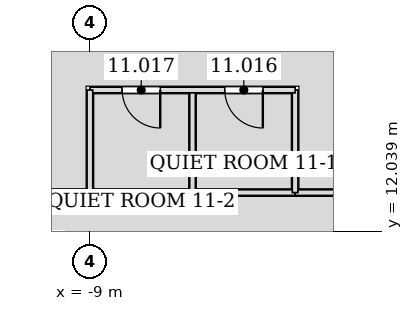
"""IFC4 building model, lengths in metres.
Left out: names, types, materials, properties, quantities, classifications, styles, units other than length and angle.
Written with IfcOpenShell. Run it as: python <this file> out.ifc"""

import sys

from ifc_helpers import new_model, si_unit, direction, frame, frame_2d, origin, place, context, subcontext, project, spatial, rectangle, extrude, element, fill, save


model = new_model("IFC4")
c1 = context("Model", 3, precision=1e-05, world=origin(), true_north=direction((0.0, 1.0)))
c2 = subcontext(c1, "Body", "Model", "MODEL_VIEW")
j1 = project(units=[si_unit("LENGTHUNIT", "METRE"), si_unit("PLANEANGLEUNIT", "RADIAN")], contexts=[c1])
p1 = place(None, origin())
s1 = spatial("IfcSite", under=j1, at=p1, CompositionType="ELEMENT")
p2 = place(p1, origin())
s2 = spatial("IfcBuilding", under=s1, at=p2, CompositionType="ELEMENT")
p3 = place(p2, frame((0.0, 0.0, 54.0)))
s3 = spatial("IfcBuildingStorey", under=s2, at=p3, CompositionType="ELEMENT", Elevation=54.0)
for number, where, z_axis, x_axis in (
    (1, (-3.599, 13.05, 0.0), (0.0, 0.0, 1.0), (-1.0, 0.0, 0.0)),
    (2, (-6.299, 13.05, 0.0), (0.0, 0.0, 1.0), (-1.0, 0.0, 0.0)),
):
    element("IfcWall", number, at=place(p3, frame(where, z_axis=z_axis, x_axis=x_axis)), inside=s3, PredefinedType="PARTITIONING", context=c2, shape_type="SweptSolid", body=[
        extrude(rectangle(XDim=2.702, YDim=0.15, at=frame_2d((1.351, 0.0))), origin(), (0.0, 0.0, 1.0), 4.035),
    ])
p4 = place(p3, frame((-8.999, 13.05, 0.0), z_axis=(0.0, 0.0, 1.0), x_axis=(-1.0, 0.0, 0.0)))
e3 = element("IfcWall", 3, at=p4, inside=s3, PredefinedType="PARTITIONING", context=c2, shape_type="SweptSolid", body=[
    extrude(rectangle(XDim=4.051, YDim=0.15, at=frame_2d((2.025, 0.0))), origin(), (0.0, 0.0, 1.0), 3.014),
])
p5 = place(p3, frame((13.05, 13.05, 0.0), z_axis=(0.0, 0.0, 1.0), x_axis=(-1.0, 0.0, 0.0)))
e4 = element("IfcWall", 4, at=p5, inside=s3, PredefinedType="PARTITIONING", context=c2, shape_type="SweptSolid", body=[
    extrude(rectangle(XDim=16.651, YDim=0.15, at=frame_2d((8.326, 0.0))), origin(), (0.0, 0.0, 1.0), 2.984),
])
p6 = place(p5, frame((7.426, 0.0, 0.0)))
e5 = element("IfcOpeningElement", 5, at=p6, cuts=e4, PredefinedType="OPENING", context=c2, shape_type="SweptSolid", body=[
    extrude(rectangle(XDim=1.8, YDim=2.4, at=frame_2d((0.9, 1.2))), frame((0.0, 0.085, 0.0), z_axis=(0.0, -1.0, 0.0), x_axis=(1.0, 0.0, 0.0)), (0.0, 0.0, 1.0), 0.17),
])
for number, where, z_axis, x_axis in (
    (6, (-6.3, 15.75, 0.0), (0.0, 0.0, 1.0), (0.0, -1.0, 0.0)),
    (7, (-3.6, 13.05, 0.0), (0.0, 0.0, 1.0), (0.0, 1.0, 0.0)),
):
    element("IfcWall", number, at=place(p3, frame(where, z_axis=z_axis, x_axis=x_axis)), inside=s3, PredefinedType="PARTITIONING", context=c2, shape_type="SweptSolid", body=[
        extrude(rectangle(XDim=2.7, YDim=0.15, at=frame_2d((1.35, 0.0))), origin(), (0.0, 0.0, 1.0), 3.423),
    ])
p7 = place(p3, frame((-3.6, 15.75, 0.0), z_axis=(0.0, 0.0, 1.0), x_axis=(-1.0, 0.0, 0.0)))
e8 = element("IfcWall", 8, at=p7, inside=s3, PredefinedType="PARTITIONING", context=c2, shape_type="SweptSolid", body=[
    extrude(rectangle(XDim=5.4, YDim=0.15, at=frame_2d((2.7, 0.0))), origin(), (0.0, 0.0, 1.0), 4.035),
])
p8 = place(p7, frame((0.85, 0.0, 0.0)))
e9 = element("IfcOpeningElement", 9, at=p8, cuts=e8, PredefinedType="OPENING", context=c2, shape_type="SweptSolid", body=[
    extrude(rectangle(XDim=1.0, YDim=2.1, at=frame_2d((0.5, 1.05))), frame((0.0, 0.085, 0.0), z_axis=(0.0, -1.0, 0.0), x_axis=(1.0, 0.0, 0.0)), (0.0, 0.0, 1.0), 0.17),
])
p9 = place(p7, frame((3.55, 0.0, 0.0)))
e10 = element("IfcOpeningElement", 10, at=p9, cuts=e8, PredefinedType="OPENING", context=c2, shape_type="SweptSolid", body=[
    extrude(rectangle(XDim=1.0, YDim=2.1, at=frame_2d((0.5, 1.05))), frame((0.0, 0.085, 0.0), z_axis=(0.0, -1.0, 0.0), x_axis=(1.0, 0.0, 0.0)), (0.0, 0.0, 1.0), 0.17),
])
p10 = place(p3, frame((-9.0, 15.75, 0.0), z_axis=(0.0, 0.0, 1.0), x_axis=(0.0, -1.0, 0.0)))
e11 = element("IfcWall", 11, at=p10, inside=s3, PredefinedType="PARTITIONING", context=c2, shape_type="SweptSolid", body=[
    extrude(rectangle(XDim=2.7, YDim=0.15, at=frame_2d((1.35, 0.0))), origin(), (0.0, 0.0, 1.0), 3.423),
])
p11 = place(p8, origin())
e12 = element("IfcDoor", 12, at=p11, inside=s3, OperationType="SINGLE_SWING_LEFT", PredefinedType="DOOR", context=c2, shape_type="SweptSolid", body=[
    extrude(rectangle(XDim=1.0, YDim=2.1, at=frame_2d((0.5, 1.05))), frame((0.0, 0.025, 0.0), z_axis=(0.0, -1.0, 0.0), x_axis=(1.0, 0.0, 0.0)), (0.0, 0.0, 1.0), 0.05),
])
fill(e9, e12)
p12 = place(p9, origin())
e13 = element("IfcDoor", 13, at=p12, inside=s3, OperationType="SINGLE_SWING_LEFT", PredefinedType="DOOR", context=c2, shape_type="SweptSolid", body=[
    extrude(rectangle(XDim=1.0, YDim=2.1, at=frame_2d((0.5, 1.05))), frame((0.0, 0.025, 0.0), z_axis=(0.0, -1.0, 0.0), x_axis=(1.0, 0.0, 0.0)), (0.0, 0.0, 1.0), 0.05),
])
fill(e10, e13)
save(model, sys.argv[1])
